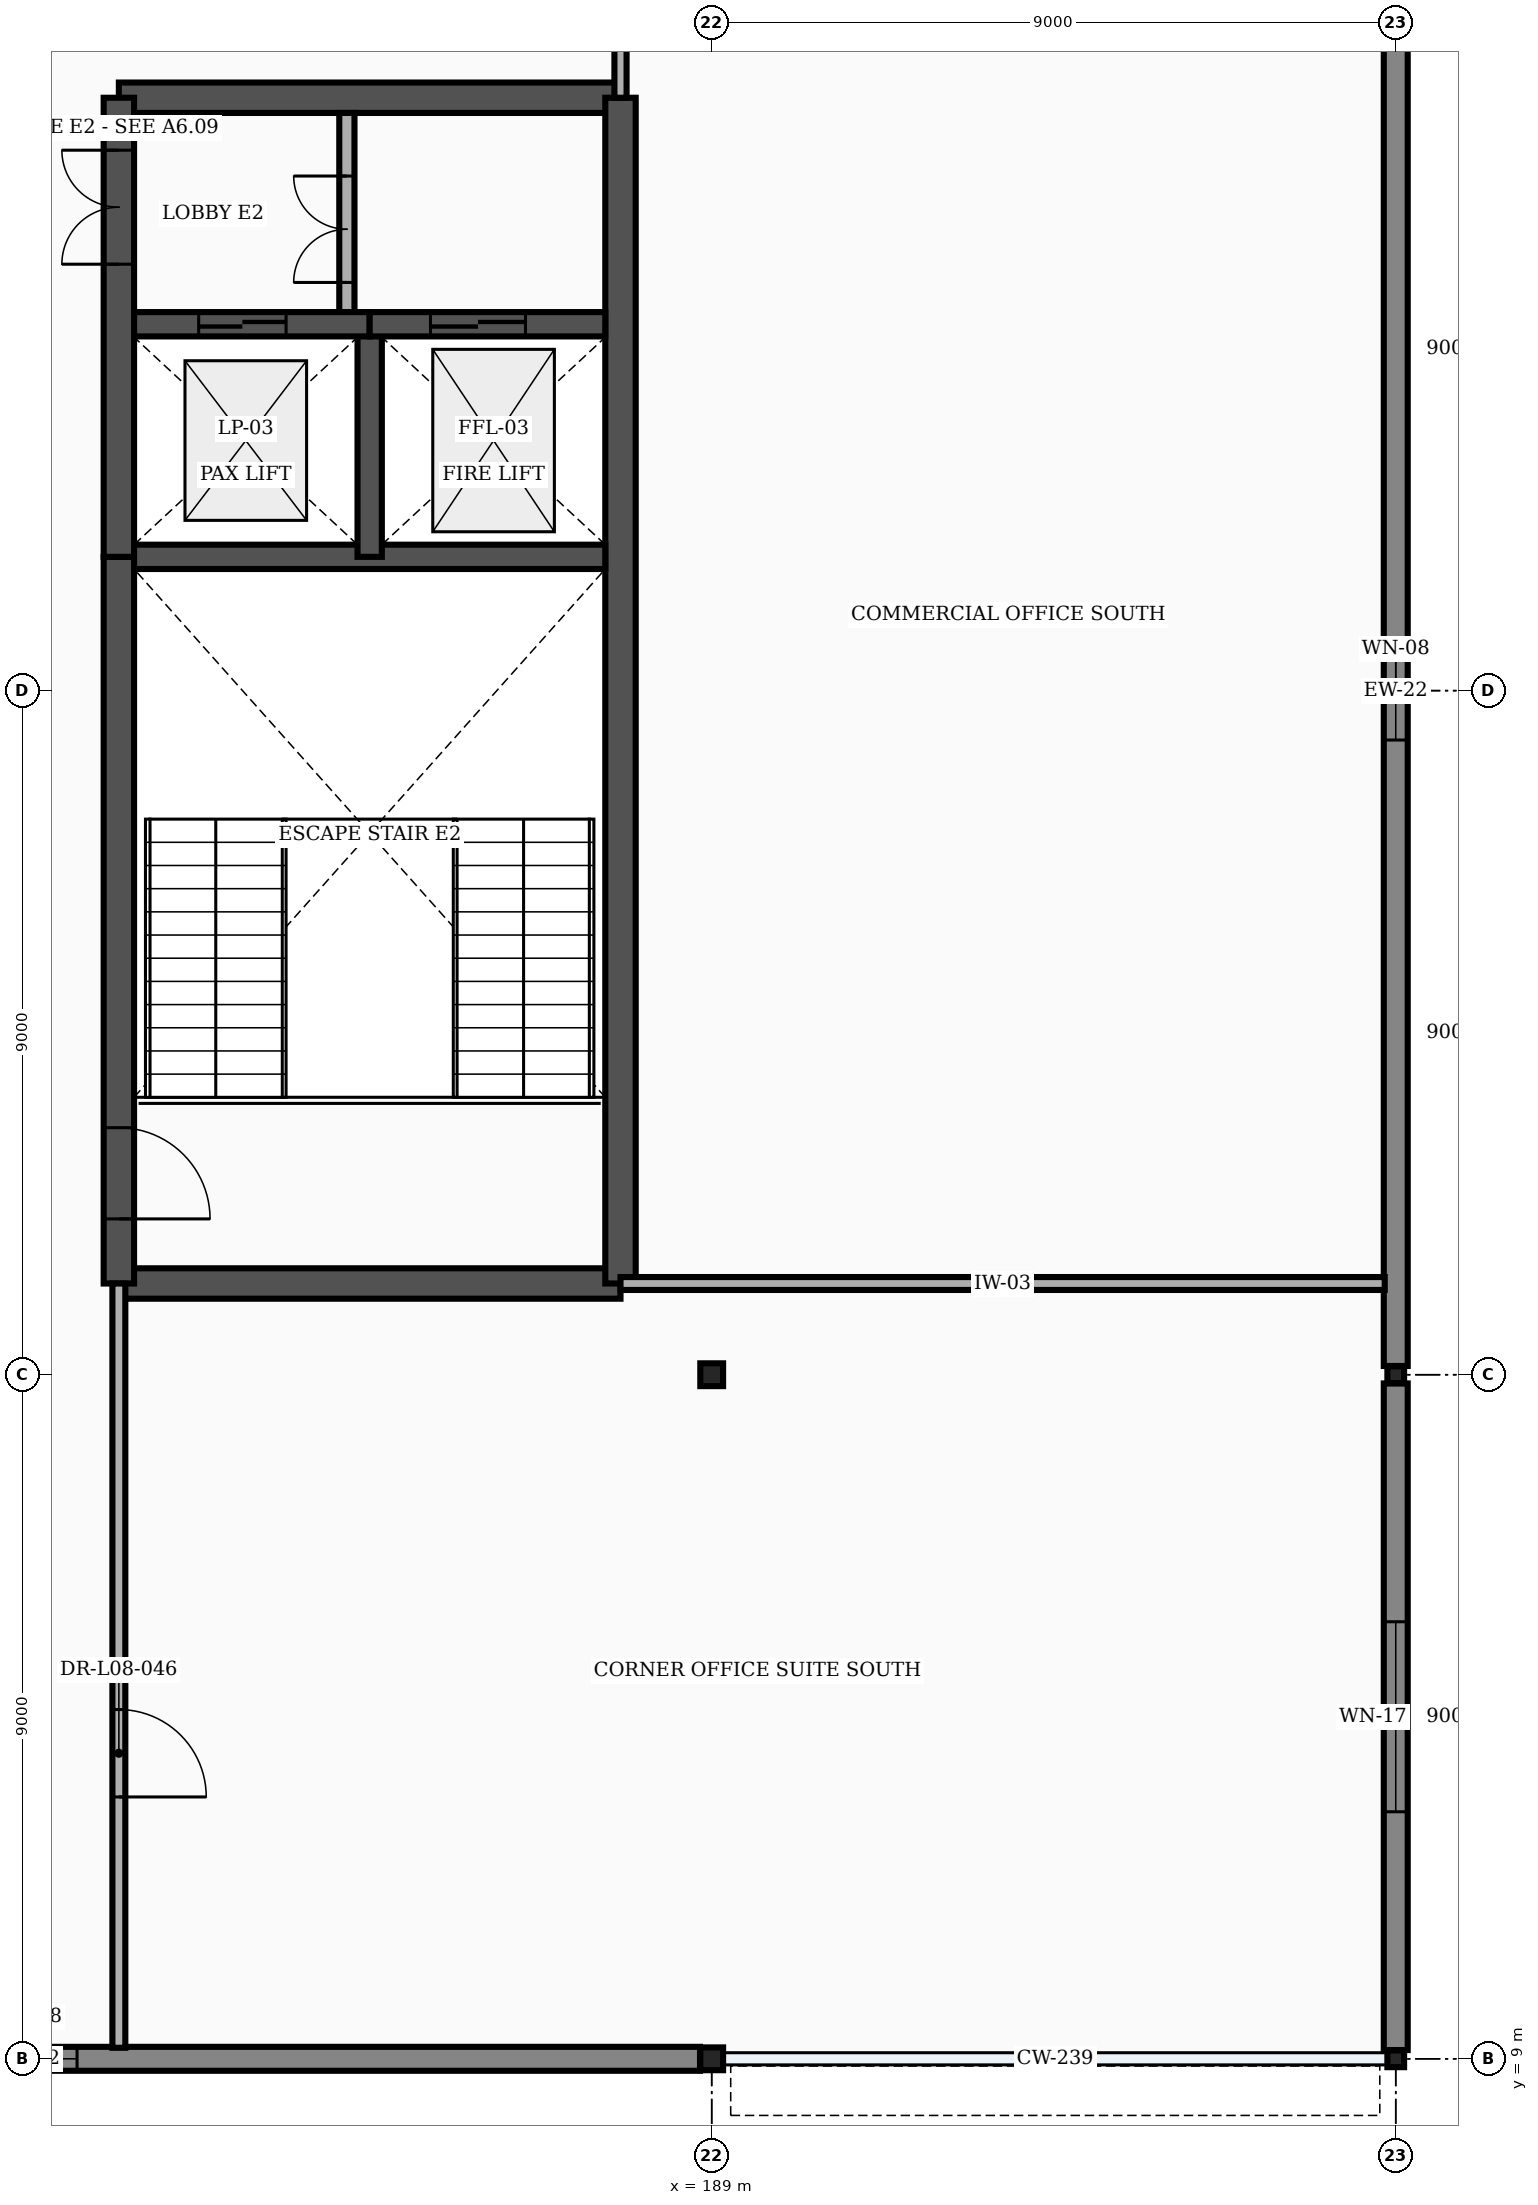
"""IFC4 building model, lengths in metres.
Left out: names, types, materials, properties, quantities, classifications, styles, units other than length and angle.
Written with IfcOpenShell. Run it as: python <this file> out.ifc"""

import sys

from ifc_helpers import new_model, si_unit, direction, frame, frame_2d, origin, origin_2d, place, context, subcontext, project, spatial, rectangle, hollow_rectangle, extrude, element, fill, save


model = new_model("IFC4")
c1 = context("Model", 3, precision=1e-05, world=origin(), true_north=direction((0.0, 1.0)))
c2 = subcontext(c1, "Body", "Model", "MODEL_VIEW")
j1 = project(units=[si_unit("LENGTHUNIT", "METRE"), si_unit("PLANEANGLEUNIT", "RADIAN")], contexts=[c1])
p1 = place(None, origin())
s1 = spatial("IfcSite", under=j1, at=p1, CompositionType="ELEMENT")
p2 = place(p1, origin())
s2 = spatial("IfcBuilding", under=s1, at=p2, CompositionType="ELEMENT")
p3 = place(p2, frame((0.0, 0.0, 37.8)))
s3 = spatial("IfcBuildingStorey", under=s2, at=p3, CompositionType="ELEMENT", Elevation=37.8)
for number, where, z_axis, x_axis in (
    (1, (189.0, 9.0, 0.0), (0.0, 0.0, 1.0), (1.0, 0.0, 0.0)),
    (2, (189.0, 18.0, 0.0), (0.0, 0.0, 1.0), (1.0, 0.0, 0.0)),
):
    element("IfcColumn", number, at=place(p3, frame(where, z_axis=z_axis, x_axis=x_axis)), inside=s3, PredefinedType="COLUMN", context=c2, shape_type="SweptSolid", body=[
        extrude(hollow_rectangle(XDim=0.3, YDim=0.3, WallThickness=0.012, at=origin_2d()), origin(), (0.0, 0.0, 1.0), 3.9),
    ])
for number, where, z_axis, x_axis in (
    (3, (198.0, 9.0, 0.0), (0.0, 0.0, 1.0), (1.0, 0.0, 0.0)),
    (4, (198.0, 18.0, 0.0), (0.0, 0.0, 1.0), (1.0, 0.0, 0.0)),
):
    element("IfcColumn", number, at=place(p3, frame(where, z_axis=z_axis, x_axis=x_axis)), inside=s3, PredefinedType="COLUMN", context=c2, shape_type="SweptSolid", body=[
        extrude(hollow_rectangle(XDim=0.22, YDim=0.22, WallThickness=0.01, at=origin_2d()), origin(), (0.0, 0.0, 1.0), 3.9),
    ])
p4 = place(p3, frame((171.154, 9.0, 0.0), z_axis=(0.0, 0.0, 1.0), x_axis=(1.0, 0.0, 0.0)))
e5 = element("IfcWall", 5, at=p4, inside=s3, PredefinedType="STANDARD", context=c2, shape_type="SweptSolid", body=[
    extrude(rectangle(XDim=17.692, YDim=0.315, at=frame_2d((8.846, 0.0))), origin(), (0.0, 0.0, 1.0), 2.803),
])
p5 = place(p4, frame((8.196, 0.0, 0.7)))
e6 = element("IfcOpeningElement", 6, at=p5, cuts=e5, PredefinedType="OPENING", context=c2, shape_type="SweptSolid", body=[
    extrude(rectangle(XDim=1.3, YDim=1.9, at=frame_2d((0.65, 0.95))), frame((0.0, 0.169, 0.0), z_axis=(0.0, -1.0, 0.0), x_axis=(1.0, 0.0, 0.0)), (0.0, 0.0, 1.0), 0.339),
])
p6 = place(p3, frame((198.0, 9.115, 0.0), z_axis=(0.0, 0.0, 1.0), x_axis=(0.0, 1.0, 0.0)))
e7 = element("IfcWall", 7, at=p6, inside=s3, PredefinedType="STANDARD", context=c2, shape_type="SweptSolid", body=[
    extrude(rectangle(XDim=8.77, YDim=0.315, at=frame_2d((4.385, 0.0))), origin(), (0.0, 0.0, 1.0), 3.565),
])
p7 = place(p6, frame((3.135, 0.0, 0.7)))
e8 = element("IfcOpeningElement", 8, at=p7, cuts=e7, PredefinedType="OPENING", context=c2, shape_type="SweptSolid", body=[
    extrude(rectangle(XDim=2.5, YDim=1.9, at=frame_2d((1.25, 0.95))), frame((0.0, 0.169, 0.0), z_axis=(0.0, -1.0, 0.0), x_axis=(1.0, 0.0, 0.0)), (0.0, 0.0, 1.0), 0.339),
])
p8 = place(p3, frame((198.0, 18.115, 0.0), z_axis=(0.0, 0.0, 1.0), x_axis=(0.0, 1.0, 0.0)))
e9 = element("IfcWall", 9, at=p8, inside=s3, PredefinedType="STANDARD", context=c2, shape_type="SweptSolid", body=[
    extrude(rectangle(XDim=17.77, YDim=0.315, at=frame_2d((8.885, 0.0))), origin(), (0.0, 0.0, 1.0), 2.953),
])
p9 = place(p8, frame((8.235, 0.0, 0.7)))
e10 = element("IfcOpeningElement", 10, at=p9, cuts=e9, PredefinedType="OPENING", context=c2, shape_type="SweptSolid", body=[
    extrude(rectangle(XDim=1.3, YDim=1.9, at=frame_2d((0.65, 0.95))), frame((0.0, 0.169, 0.0), z_axis=(0.0, -1.0, 0.0), x_axis=(1.0, 0.0, 0.0)), (0.0, 0.0, 1.0), 0.339),
])
for number, where, z_axis, x_axis in (
    (11, (181.2, 19.2, 0.0), (0.0, 0.0, 1.0), (1.0, 0.0, 0.0)),
    (12, (181.2, 34.8, 0.0), (0.0, 0.0, 1.0), (1.0, 0.0, 0.0)),
):
    element("IfcWall", number, at=place(p3, frame(where, z_axis=z_axis, x_axis=x_axis)), inside=s3, PredefinedType="SHEAR", context=c2, shape_type="SweptSolid", body=[
        extrude(rectangle(XDim=6.6, YDim=0.4, at=frame_2d((3.3, 0.0))), origin(), (0.0, 0.0, 1.0), 3.565),
    ])
p10 = place(p3, frame((187.8, 19.2, 0.0), z_axis=(0.0, 0.0, 1.0), x_axis=(0.0, 1.0, 0.0)))
e13 = element("IfcWall", 13, at=p10, inside=s3, PredefinedType="SHEAR", context=c2, shape_type="SweptSolid", body=[
    extrude(rectangle(XDim=15.6, YDim=0.4, at=frame_2d((7.8, 0.0))), origin(), (0.0, 0.0, 1.0), 3.565),
])
p11 = place(p3, frame((181.2, 19.2, 0.0), z_axis=(0.0, 0.0, 1.0), x_axis=(0.0, 1.0, 0.0)))
e14 = element("IfcWall", 14, at=p11, inside=s3, PredefinedType="SHEAR", context=c2, shape_type="SweptSolid", body=[
    extrude(rectangle(XDim=9.56, YDim=0.4, at=frame_2d((4.78, 0.0))), origin(), (0.0, 0.0, 1.0), 3.565),
])
p12 = place(p11, frame((0.85, 0.0, 0.0)))
e15 = element("IfcOpeningElement", 15, at=p12, cuts=e14, PredefinedType="OPENING", context=c2, shape_type="SweptSolid", body=[
    extrude(rectangle(XDim=1.2, YDim=2.2, at=frame_2d((0.6, 1.1))), frame((0.0, 0.212, 0.0), z_axis=(0.0, -1.0, 0.0), x_axis=(1.0, 0.0, 0.0)), (0.0, 0.0, 1.0), 0.424),
])
p13 = place(p3, frame((181.2, 28.76, 0.0), z_axis=(0.0, 0.0, 1.0), x_axis=(0.0, 1.0, 0.0)))
e16 = element("IfcWall", 16, at=p13, inside=s3, PredefinedType="SHEAR", context=c2, shape_type="SweptSolid", body=[
    extrude(rectangle(XDim=6.04, YDim=0.4, at=frame_2d((3.02, 0.0))), origin(), (0.0, 0.0, 1.0), 3.565),
])
p14 = place(p13, frame((3.85, 0.0, 0.0)))
e17 = element("IfcOpeningElement", 17, at=p14, cuts=e16, PredefinedType="OPENING", context=c2, shape_type="SweptSolid", body=[
    extrude(rectangle(XDim=1.5, YDim=2.2, at=frame_2d((0.75, 1.1))), frame((0.0, 0.212, 0.0), z_axis=(0.0, -1.0, 0.0), x_axis=(1.0, 0.0, 0.0)), (0.0, 0.0, 1.0), 0.424),
])
p15 = place(p3, frame((181.4, 28.76, 0.0), z_axis=(0.0, 0.0, 1.0), x_axis=(1.0, 0.0, 0.0)))
e18 = element("IfcWall", 18, at=p15, inside=s3, PredefinedType="SHEAR", context=c2, shape_type="SweptSolid", body=[
    extrude(rectangle(XDim=6.2, YDim=0.32, at=frame_2d((3.1, 0.0))), origin(), (0.0, 0.0, 1.0), 3.565),
])
p16 = place(p3, frame((184.5, 28.76, 0.0), z_axis=(0.0, 0.0, 1.0), x_axis=(0.0, 1.0, 0.0)))
e19 = element("IfcWall", 19, at=p16, inside=s3, PredefinedType="SHEAR", context=c2, shape_type="SweptSolid", body=[
    extrude(rectangle(XDim=3.06, YDim=0.32, at=frame_2d((1.53, 0.0))), origin(), (0.0, 0.0, 1.0), 3.565),
])
p17 = place(p3, frame((184.2, 31.82, 0.0), z_axis=(0.0, 0.0, 1.0), x_axis=(0.0, 1.0, 0.0)))
e20 = element("IfcWall", 20, at=p17, inside=s3, PredefinedType="PARTITIONING", context=c2, shape_type="SweptSolid", body=[
    extrude(rectangle(XDim=2.78, YDim=0.2, at=frame_2d((1.39, 0.0))), origin(), (0.0, 0.0, 1.0), 3.565),
])
p18 = place(p17, frame((0.55, 0.0, 0.0)))
e21 = element("IfcOpeningElement", 21, at=p18, cuts=e20, PredefinedType="OPENING", context=c2, shape_type="SweptSolid", body=[
    extrude(rectangle(XDim=1.4, YDim=2.25, at=frame_2d((0.7, 1.125))), frame((0.0, 0.112, 0.0), z_axis=(0.0, -1.0, 0.0), x_axis=(1.0, 0.0, 0.0)), (0.0, 0.0, 1.0), 0.224),
])
p19 = place(p3, frame((181.4, 31.82, 0.0), z_axis=(0.0, 0.0, 1.0), x_axis=(1.0, 0.0, 0.0)))
e22 = element("IfcWall", 22, at=p19, inside=s3, PredefinedType="SHEAR", context=c2, shape_type="SweptSolid", body=[
    extrude(rectangle(XDim=3.1, YDim=0.32, at=frame_2d((1.55, 0.0))), origin(), (0.0, 0.0, 1.0), 3.565),
])
p20 = place(p19, frame((0.85, 0.0, 0.0)))
e23 = element("IfcOpeningElement", 23, at=p20, cuts=e22, PredefinedType="OPENING", context=c2, shape_type="SweptSolid", body=[
    extrude(rectangle(XDim=1.15, YDim=2.2, at=frame_2d((0.575, 1.1))), frame((0.0, 0.172, 0.0), z_axis=(0.0, -1.0, 0.0), x_axis=(1.0, 0.0, 0.0)), (0.0, 0.0, 1.0), 0.344),
])
p21 = place(p3, frame((184.5, 31.82, 0.0), z_axis=(0.0, 0.0, 1.0), x_axis=(1.0, 0.0, 0.0)))
e24 = element("IfcWall", 24, at=p21, inside=s3, PredefinedType="SHEAR", context=c2, shape_type="SweptSolid", body=[
    extrude(rectangle(XDim=3.1, YDim=0.32, at=frame_2d((1.55, 0.0))), origin(), (0.0, 0.0, 1.0), 3.565),
])
p22 = place(p21, frame((0.8, 0.0, 0.0)))
e25 = element("IfcOpeningElement", 25, at=p22, cuts=e24, PredefinedType="OPENING", context=c2, shape_type="SweptSolid", body=[
    extrude(rectangle(XDim=1.25, YDim=2.25, at=frame_2d((0.625, 1.125))), frame((0.0, 0.172, 0.0), z_axis=(0.0, -1.0, 0.0), x_axis=(1.0, 0.0, 0.0)), (0.0, 0.0, 1.0), 0.344),
])
p23 = place(p3, frame((187.8, 34.8, 0.0), z_axis=(0.0, 0.0, 1.0), x_axis=(0.0, 1.0, 0.0)))
e26 = element("IfcWall", 26, at=p23, inside=s3, PredefinedType="PARTITIONING", context=c2, shape_type="SweptSolid", body=[
    extrude(rectangle(XDim=2.0, YDim=0.16, at=frame_2d((1.0, 0.0))), origin(), (0.0, 0.0, 1.0), 3.565),
])
p24 = place(p3, frame((187.8, 19.2, 0.0), z_axis=(0.0, 0.0, 1.0), x_axis=(1.0, 0.0, 0.0)))
e27 = element("IfcWall", 27, at=p24, inside=s3, PredefinedType="PARTITIONING", context=c2, shape_type="SweptSolid", body=[
    extrude(rectangle(XDim=10.055, YDim=0.17, at=frame_2d((5.027, 0.0))), origin(), (0.0, 0.0, 1.0), 3.565),
])
p25 = place(p3, frame((181.2, 9.145, 0.0), z_axis=(0.0, 0.0, 1.0), x_axis=(0.0, 1.0, 0.0)))
e28 = element("IfcWall", 28, at=p25, inside=s3, PredefinedType="PARTITIONING", context=c2, shape_type="SweptSolid", body=[
    extrude(rectangle(XDim=10.055, YDim=0.17, at=frame_2d((5.027, 0.0))), origin(), (0.0, 0.0, 1.0), 3.565),
])
p26 = place(p25, frame((3.3, 0.0, 0.0)))
e29 = element("IfcOpeningElement", 29, at=p26, cuts=e28, PredefinedType="OPENING", context=c2, shape_type="SweptSolid", body=[
    extrude(rectangle(XDim=1.15, YDim=2.15, at=frame_2d((0.575, 1.075))), frame((0.0, 0.097, 0.0), z_axis=(0.0, -1.0, 0.0), x_axis=(1.0, 0.0, 0.0)), (0.0, 0.0, 1.0), 0.194),
])
p27 = place(p5, origin())
e30 = element("IfcWindow", 30, at=p27, inside=s3, PartitioningType="SINGLE_PANEL", PredefinedType="WINDOW", context=c2, shape_type="SweptSolid", body=[
    extrude(rectangle(XDim=1.3, YDim=1.9, at=frame_2d((0.65, 0.95))), frame((0.0, 0.03, 0.0), z_axis=(0.0, -1.0, 0.0), x_axis=(1.0, 0.0, 0.0)), (0.0, 0.0, 1.0), 0.06),
])
fill(e6, e30)
p28 = place(p7, origin())
e31 = element("IfcWindow", 31, at=p28, inside=s3, PartitioningType="SINGLE_PANEL", PredefinedType="WINDOW", context=c2, shape_type="SweptSolid", body=[
    extrude(rectangle(XDim=2.5, YDim=1.9, at=frame_2d((1.25, 0.95))), frame((0.0, 0.03, 0.0), z_axis=(0.0, -1.0, 0.0), x_axis=(1.0, 0.0, 0.0)), (0.0, 0.0, 1.0), 0.06),
])
fill(e8, e31)
p29 = place(p9, origin())
e32 = element("IfcWindow", 32, at=p29, inside=s3, PartitioningType="SINGLE_PANEL", PredefinedType="WINDOW", context=c2, shape_type="SweptSolid", body=[
    extrude(rectangle(XDim=1.3, YDim=1.9, at=frame_2d((0.65, 0.95))), frame((0.0, 0.03, 0.0), z_axis=(0.0, -1.0, 0.0), x_axis=(1.0, 0.0, 0.0)), (0.0, 0.0, 1.0), 0.06),
])
fill(e10, e32)
p30 = place(p12, frame((1.2, 0.0, 0.0), z_axis=(0.0, 0.0, 1.0), x_axis=(-1.0, 0.0, 0.0)))
e33 = element("IfcDoor", 33, at=p30, inside=s3, OperationType="SINGLE_SWING_RIGHT", PredefinedType="DOOR", context=c2, shape_type="SweptSolid", body=[
    extrude(rectangle(XDim=1.2, YDim=2.2, at=frame_2d((0.6, 1.1))), frame((0.0, 0.025, 0.0), z_axis=(0.0, -1.0, 0.0), x_axis=(1.0, 0.0, 0.0)), (0.0, 0.0, 1.0), 0.05),
])
fill(e15, e33)
p31 = place(p14, origin())
e34 = element("IfcDoor", 34, at=p31, inside=s3, OperationType="DOUBLE_DOOR_SINGLE_SWING", PredefinedType="DOOR", context=c2, shape_type="SweptSolid", body=[
    extrude(rectangle(XDim=1.5, YDim=2.2, at=frame_2d((0.75, 1.1))), frame((0.0, 0.025, 0.0), z_axis=(0.0, -1.0, 0.0), x_axis=(1.0, 0.0, 0.0)), (0.0, 0.0, 1.0), 0.05),
])
fill(e17, e34)
p32 = place(p18, origin())
e35 = element("IfcDoor", 35, at=p32, inside=s3, OperationType="DOUBLE_DOOR_SINGLE_SWING", PredefinedType="DOOR", context=c2, shape_type="SweptSolid", body=[
    extrude(rectangle(XDim=1.4, YDim=2.25, at=frame_2d((0.7, 1.125))), frame((0.0, 0.025, 0.0), z_axis=(0.0, -1.0, 0.0), x_axis=(1.0, 0.0, 0.0)), (0.0, 0.0, 1.0), 0.05),
])
fill(e21, e35)
p33 = place(p20, origin())
e36 = element("IfcDoor", 36, at=p33, inside=s3, OperationType="DOUBLE_DOOR_SLIDING", PredefinedType="DOOR", context=c2, shape_type="SweptSolid", body=[
    extrude(rectangle(XDim=1.15, YDim=2.2, at=frame_2d((0.575, 1.1))), frame((0.0, 0.025, 0.0), z_axis=(0.0, -1.0, 0.0), x_axis=(1.0, 0.0, 0.0)), (0.0, 0.0, 1.0), 0.05),
])
fill(e23, e36)
p34 = place(p22, origin())
e37 = element("IfcDoor", 37, at=p34, inside=s3, OperationType="DOUBLE_DOOR_SLIDING", PredefinedType="DOOR", context=c2, shape_type="SweptSolid", body=[
    extrude(rectangle(XDim=1.25, YDim=2.25, at=frame_2d((0.625, 1.125))), frame((0.0, 0.025, 0.0), z_axis=(0.0, -1.0, 0.0), x_axis=(1.0, 0.0, 0.0)), (0.0, 0.0, 1.0), 0.05),
])
fill(e25, e37)
p35 = place(p26, frame((1.15, 0.0, 0.0), z_axis=(0.0, 0.0, 1.0), x_axis=(-1.0, 0.0, 0.0)))
e38 = element("IfcDoor", 38, at=p35, inside=s3, OperationType="SINGLE_SWING_RIGHT", PredefinedType="DOOR", context=c2, shape_type="SweptSolid", body=[
    extrude(rectangle(XDim=1.15, YDim=2.15, at=frame_2d((0.575, 1.075))), frame((0.0, 0.025, 0.0), z_axis=(0.0, -1.0, 0.0), x_axis=(1.0, 0.0, 0.0)), (0.0, 0.0, 1.0), 0.05),
])
fill(e29, e38)
save(model, sys.argv[1])
